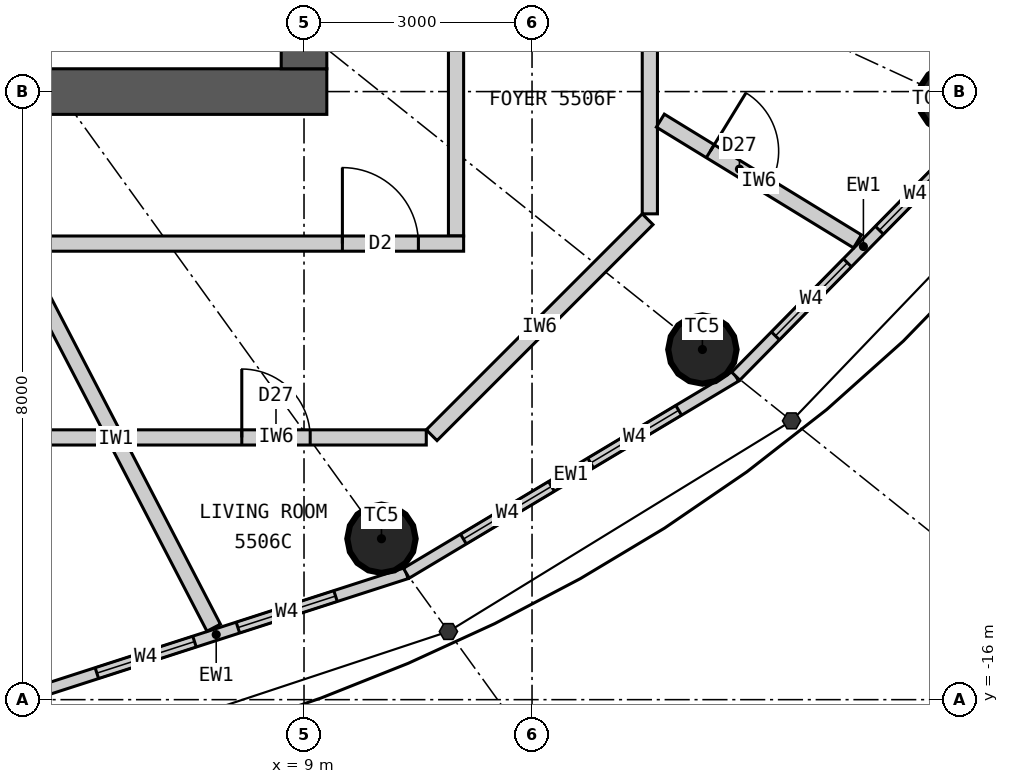
"""IFC4 building model, lengths in metres.
Left out: names, types, materials, properties, quantities, classifications, styles, units other than length and angle.
Written with IfcOpenShell. Run it as: python <this file> out.ifc"""

import sys

from ifc_helpers import new_model, si_unit, direction, frame, frame_2d, origin, origin_2d, place, context, subcontext, project, spatial, rectangle, circle, extrude, element, fill, save


model = new_model("IFC4")
c1 = context("Model", 3, precision=1e-05, world=origin(), true_north=direction((0.0, 1.0)))
c2 = subcontext(c1, "Body", "Model", "MODEL_VIEW")
j1 = project(units=[si_unit("LENGTHUNIT", "METRE"), si_unit("PLANEANGLEUNIT", "RADIAN")], contexts=[c1])
p1 = place(None, origin())
s1 = spatial("IfcSite", under=j1, at=p1, CompositionType="ELEMENT")
p2 = place(p1, origin())
s2 = spatial("IfcBuilding", under=s1, at=p2, CompositionType="ELEMENT")
p3 = place(p2, frame((0.0, 0.0, 206.1)))
s3 = spatial("IfcBuildingStorey", under=s2, at=p3, CompositionType="ELEMENT", Elevation=206.1)
for number, where, z_axis, x_axis in (
    (1, (10.019, -13.883, 0.0), (0.0, 0.0, 1.0), (1.0, 0.0, 0.0)),
    (2, (14.241, -11.393, 0.0), (0.0, 0.0, 1.0), (1.0, 0.0, 0.0)),
    (3, (17.532, -8.098, 0.0), (0.0, 0.0, 1.0), (1.0, 0.0, 0.0)),
):
    element("IfcColumn", number, at=place(p3, frame(where, z_axis=z_axis, x_axis=x_axis)), inside=s3, PredefinedType="COLUMN", context=c2, shape_type="SweptSolid", body=[
        extrude(circle(Radius=0.45, at=origin_2d()), origin(), (0.0, 0.0, 1.0), 3.3),
    ])
p4 = place(p3, frame((9.3, -8.0, 0.0), z_axis=(0.0, 0.0, 1.0), x_axis=(-1.0, 0.0, 0.0)))
e4 = element("IfcWall", 4, at=p4, inside=s3, PredefinedType="SHEAR", context=c2, shape_type="SweptSolid", body=[
    extrude(rectangle(XDim=18.6, YDim=0.6, at=frame_2d((9.3, 0.0))), origin(), (0.0, 0.0, 1.0), 3.3),
])
p5 = place(p4, frame((8.0, 0.0, 0.0)))
e5 = element("IfcOpeningElement", 5, at=p5, cuts=e4, PredefinedType="OPENING", context=c2, shape_type="SweptSolid", body=[
    extrude(rectangle(XDim=1.2, YDim=2.2, at=frame_2d((0.6, 1.1))), frame((0.0, 0.31, 0.0), z_axis=(0.0, -1.0, 0.0), x_axis=(1.0, 0.0, 0.0)), (0.0, 0.0, 1.0), 0.62),
])
p6 = place(p4, frame((15.6, 0.0, 0.0)))
e6 = element("IfcOpeningElement", 6, at=p6, cuts=e4, PredefinedType="OPENING", context=c2, shape_type="SweptSolid", body=[
    extrude(rectangle(XDim=0.9, YDim=2.2, at=frame_2d((0.45, 1.1))), frame((0.0, 0.31, 0.0), z_axis=(0.0, -1.0, 0.0), x_axis=(1.0, 0.0, 0.0)), (0.0, 0.0, 1.0), 0.62),
])
p7 = place(p3, frame((9.0, -7.7, 0.0), z_axis=(0.0, 0.0, 1.0), x_axis=(0.0, 1.0, 0.0)))
e7 = element("IfcWall", 7, at=p7, inside=s3, PredefinedType="SHEAR", context=c2, shape_type="SweptSolid", body=[
    extrude(rectangle(XDim=15.4, YDim=0.6, at=frame_2d((7.7, 0.0))), origin(), (0.0, 0.0, 1.0), 3.3),
])
p8 = place(p7, frame((6.8, 0.0, 0.0)))
e8 = element("IfcOpeningElement", 8, at=p8, cuts=e7, PredefinedType="OPENING", context=c2, shape_type="SweptSolid", body=[
    extrude(rectangle(XDim=1.8, YDim=2.2, at=frame_2d((0.9, 1.1))), frame((0.0, 0.31, 0.0), z_axis=(0.0, -1.0, 0.0), x_axis=(1.0, 0.0, 0.0)), (0.0, 0.0, 1.0), 0.62),
])
p9 = place(p3, frame((5.343, -15.952, 0.0), z_axis=(0.0, 0.0, 1.0), x_axis=(0.951644702515, 0.307200846638, 0.0)))
e9 = element("IfcWall", 9, at=p9, inside=s3, PredefinedType="ELEMENTEDWALL", context=c2, shape_type="SweptSolid", body=[
    extrude(rectangle(XDim=5.258, YDim=0.15, at=frame_2d((2.629, 0.0))), origin(), (0.0, 0.0, 1.0), 3.12),
])
p10 = place(p9, frame((0.979, 0.0, 0.9)))
e10 = element("IfcOpeningElement", 10, at=p10, cuts=e9, PredefinedType="OPENING", context=c2, shape_type="SweptSolid", body=[
    extrude(rectangle(XDim=1.35, YDim=1.9, at=frame_2d((0.675, 0.95))), frame((0.0, 0.085, 0.0), z_axis=(0.0, -1.0, 0.0), x_axis=(1.0, 0.0, 0.0)), (0.0, 0.0, 1.0), 0.17),
])
p11 = place(p9, frame((2.929, 0.0, 0.9)))
e11 = element("IfcOpeningElement", 11, at=p11, cuts=e9, PredefinedType="OPENING", context=c2, shape_type="SweptSolid", body=[
    extrude(rectangle(XDim=1.35, YDim=1.9, at=frame_2d((0.675, 0.95))), frame((0.0, 0.085, 0.0), z_axis=(0.0, -1.0, 0.0), x_axis=(1.0, 0.0, 0.0)), (0.0, 0.0, 1.0), 0.17),
])
p12 = place(p3, frame((10.346, -14.336, 0.0), z_axis=(0.0, 0.0, 1.0), x_axis=(0.85822150553, 0.513279502265, 0.0)))
e12 = element("IfcWall", 12, at=p12, inside=s3, PredefinedType="ELEMENTEDWALL", context=c2, shape_type="SweptSolid", body=[
    extrude(rectangle(XDim=5.05, YDim=0.15, at=frame_2d((2.525, 0.0))), origin(), (0.0, 0.0, 1.0), 3.12),
])
p13 = place(p12, frame((0.875, 0.0, 0.9)))
e13 = element("IfcOpeningElement", 13, at=p13, cuts=e12, PredefinedType="OPENING", context=c2, shape_type="SweptSolid", body=[
    extrude(rectangle(XDim=1.35, YDim=1.9, at=frame_2d((0.675, 0.95))), frame((0.0, 0.085, 0.0), z_axis=(0.0, -1.0, 0.0), x_axis=(1.0, 0.0, 0.0)), (0.0, 0.0, 1.0), 0.17),
])
p14 = place(p12, frame((2.825, 0.0, 0.9)))
e14 = element("IfcOpeningElement", 14, at=p14, cuts=e12, PredefinedType="OPENING", context=c2, shape_type="SweptSolid", body=[
    extrude(rectangle(XDim=1.35, YDim=1.9, at=frame_2d((0.675, 0.95))), frame((0.0, 0.085, 0.0), z_axis=(0.0, -1.0, 0.0), x_axis=(1.0, 0.0, 0.0)), (0.0, 0.0, 1.0), 0.17),
])
p15 = place(p3, frame((14.68, -11.744, 0.0), z_axis=(0.0, 0.0, 1.0), x_axis=(0.701527379618, 0.712642501993, 0.0)))
e15 = element("IfcWall", 15, at=p15, inside=s3, PredefinedType="ELEMENTEDWALL", context=c2, shape_type="SweptSolid", body=[
    extrude(rectangle(XDim=4.788, YDim=0.15, at=frame_2d((2.394, 0.0))), origin(), (0.0, 0.0, 1.0), 3.12),
])
p16 = place(p15, frame((0.744, 0.0, 0.9)))
e16 = element("IfcOpeningElement", 16, at=p16, cuts=e15, PredefinedType="OPENING", context=c2, shape_type="SweptSolid", body=[
    extrude(rectangle(XDim=1.35, YDim=1.9, at=frame_2d((0.675, 0.95))), frame((0.0, 0.085, 0.0), z_axis=(0.0, -1.0, 0.0), x_axis=(1.0, 0.0, 0.0)), (0.0, 0.0, 1.0), 0.17),
])
p17 = place(p15, frame((2.694, 0.0, 0.9)))
e17 = element("IfcOpeningElement", 17, at=p17, cuts=e15, PredefinedType="OPENING", context=c2, shape_type="SweptSolid", body=[
    extrude(rectangle(XDim=1.35, YDim=1.9, at=frame_2d((0.675, 0.95))), frame((0.0, 0.085, 0.0), z_axis=(0.0, -1.0, 0.0), x_axis=(1.0, 0.0, 0.0)), (0.0, 0.0, 1.0), 0.17),
])
p18 = place(p3, frame((11.0, -9.9, 0.0), z_axis=(0.0, 0.0, 1.0), x_axis=(0.0, 1.0, 0.0)))
e18 = element("IfcWall", 18, at=p18, inside=s3, PredefinedType="PARTITIONING", context=c2, shape_type="SweptSolid", body=[
    extrude(rectangle(XDim=19.8, YDim=0.2, at=frame_2d((9.9, 0.0))), origin(), (0.0, 0.0, 1.0), 3.12),
])
p19 = place(p3, frame((11.1, -10.0, 0.0), z_axis=(0.0, 0.0, 1.0), x_axis=(-1.0, 0.0, 0.0)))
e19 = element("IfcWall", 19, at=p19, inside=s3, PredefinedType="PARTITIONING", context=c2, shape_type="SweptSolid", body=[
    extrude(rectangle(XDim=22.2, YDim=0.2, at=frame_2d((11.1, 0.0))), origin(), (0.0, 0.0, 1.0), 3.12),
])
p20 = place(p19, frame((11.36, 0.0, 0.0)))
e20 = element("IfcOpeningElement", 20, at=p20, cuts=e19, PredefinedType="OPENING", context=c2, shape_type="SweptSolid", body=[
    extrude(rectangle(XDim=1.0, YDim=2.2, at=frame_2d((0.5, 1.1))), frame((0.0, 0.11, 0.0), z_axis=(0.0, -1.0, 0.0), x_axis=(1.0, 0.0, 0.0)), (0.0, 0.0, 1.0), 0.22),
])
p21 = place(p19, frame((0.595, 0.0, 0.0)))
e21 = element("IfcOpeningElement", 21, at=p21, cuts=e19, PredefinedType="OPENING", context=c2, shape_type="SweptSolid", body=[
    extrude(rectangle(XDim=1.0, YDim=2.2, at=frame_2d((0.5, 1.1))), frame((0.0, 0.11, 0.0), z_axis=(0.0, -1.0, 0.0), x_axis=(1.0, 0.0, 0.0)), (0.0, 0.0, 1.0), 0.22),
])
p22 = place(p3, frame((5.241, -10.1, 0.0), z_axis=(0.0, 0.0, 1.0), x_axis=(0.460603196597, -0.887606160008, 0.0)))
e22 = element("IfcWall", 22, at=p22, inside=s3, PredefinedType="PARTITIONING", context=c2, shape_type="SweptSolid", body=[
    extrude(rectangle(XDim=5.58, YDim=0.2, at=frame_2d((2.79, 0.0))), origin(), (0.0, 0.0, 1.0), 3.12),
])
p23 = place(p3, frame((-4.082, -12.55, 0.0), z_axis=(0.0, 0.0, 1.0), x_axis=(1.0, 0.0, 0.0)))
e23 = element("IfcWall", 23, at=p23, inside=s3, PredefinedType="PARTITIONING", context=c2, shape_type="SweptSolid", body=[
    extrude(rectangle(XDim=10.446, YDim=0.2, at=frame_2d((5.223, 0.0))), origin(), (0.0, 0.0, 1.0), 3.12),
])
p24 = place(p23, frame((6.757, 0.0, 0.0)))
e24 = element("IfcOpeningElement", 24, at=p24, cuts=e23, PredefinedType="OPENING", context=c2, shape_type="SweptSolid", body=[
    extrude(rectangle(XDim=0.8, YDim=2.1, at=frame_2d((0.4, 1.05))), frame((0.0, 0.11, 0.0), z_axis=(0.0, -1.0, 0.0), x_axis=(1.0, 0.0, 0.0)), (0.0, 0.0, 1.0), 0.22),
])
p25 = place(p23, frame((3.372, 0.0, 0.0)))
e25 = element("IfcOpeningElement", 25, at=p25, cuts=e23, PredefinedType="OPENING", context=c2, shape_type="SweptSolid", body=[
    extrude(rectangle(XDim=0.9, YDim=2.1, at=frame_2d((0.45, 1.05))), frame((0.0, 0.11, 0.0), z_axis=(0.0, -1.0, 0.0), x_axis=(1.0, 0.0, 0.0)), (0.0, 0.0, 1.0), 0.22),
])
p26 = place(p3, frame((6.661, -12.55, 0.0), z_axis=(0.0, 0.0, 1.0), x_axis=(1.0, 0.0, 0.0)))
e26 = element("IfcWall", 26, at=p26, inside=s3, PredefinedType="PARTITIONING", context=c2, shape_type="SweptSolid", body=[
    extrude(rectangle(XDim=3.947, YDim=0.2, at=frame_2d((1.974, 0.0))), origin(), (0.0, 0.0, 1.0), 3.12),
])
p27 = place(p26, frame((1.52, 0.0, 0.0)))
e27 = element("IfcOpeningElement", 27, at=p27, cuts=e26, PredefinedType="OPENING", context=c2, shape_type="SweptSolid", body=[
    extrude(rectangle(XDim=0.9, YDim=2.1, at=frame_2d((0.45, 1.05))), frame((0.0, 0.11, 0.0), z_axis=(0.0, -1.0, 0.0), x_axis=(1.0, 0.0, 0.0)), (0.0, 0.0, 1.0), 0.22),
])
p28 = place(p3, frame((10.679, -12.521, 0.0), z_axis=(0.0, 0.0, 1.0), x_axis=(0.707106781187, 0.707106781187, 0.0)))
e28 = element("IfcWall", 28, at=p28, inside=s3, PredefinedType="PARTITIONING", context=c2, shape_type="SweptSolid", body=[
    extrude(rectangle(XDim=4.019, YDim=0.2, at=frame_2d((2.009, 0.0))), origin(), (0.0, 0.0, 1.0), 3.12),
])
p29 = place(p3, frame((13.55, -9.609, 0.0), z_axis=(0.0, 0.0, 1.0), x_axis=(0.0, 1.0, 0.0)))
e29 = element("IfcWall", 29, at=p29, inside=s3, PredefinedType="PARTITIONING", context=c2, shape_type="SweptSolid", body=[
    extrude(rectangle(XDim=10.93, YDim=0.2, at=frame_2d((5.465, 0.0))), origin(), (0.0, 0.0, 1.0), 3.12),
])
p30 = place(p29, frame((5.02, 0.0, 0.0)))
e30 = element("IfcOpeningElement", 30, at=p30, cuts=e29, PredefinedType="OPENING", context=c2, shape_type="SweptSolid", body=[
    extrude(rectangle(XDim=0.9, YDim=2.1, at=frame_2d((0.45, 1.05))), frame((0.0, 0.11, 0.0), z_axis=(0.0, -1.0, 0.0), x_axis=(1.0, 0.0, 0.0)), (0.0, 0.0, 1.0), 0.22),
])
p31 = place(p29, frame((6.877, 0.0, 0.0)))
e31 = element("IfcOpeningElement", 31, at=p31, cuts=e29, PredefinedType="OPENING", context=c2, shape_type="SweptSolid", body=[
    extrude(rectangle(XDim=0.9, YDim=2.1, at=frame_2d((0.45, 1.05))), frame((0.0, 0.11, 0.0), z_axis=(0.0, -1.0, 0.0), x_axis=(1.0, 0.0, 0.0)), (0.0, 0.0, 1.0), 0.22),
])
p32 = place(p29, frame((8.565, 0.0, 0.0)))
e32 = element("IfcOpeningElement", 32, at=p32, cuts=e29, PredefinedType="OPENING", context=c2, shape_type="SweptSolid", body=[
    extrude(rectangle(XDim=0.8, YDim=2.1, at=frame_2d((0.4, 1.05))), frame((0.0, 0.11, 0.0), z_axis=(0.0, -1.0, 0.0), x_axis=(1.0, 0.0, 0.0)), (0.0, 0.0, 1.0), 0.22),
])
p33 = place(p3, frame((13.688, -8.382, 0.0), z_axis=(0.0, 0.0, 1.0), x_axis=(0.852783459586, -0.522264656144, 0.0)))
e33 = element("IfcWall", 33, at=p33, inside=s3, PredefinedType="PARTITIONING", context=c2, shape_type="SweptSolid", body=[
    extrude(rectangle(XDim=3.042, YDim=0.2, at=frame_2d((1.521, 0.0))), origin(), (0.0, 0.0, 1.0), 3.12),
])
p34 = place(p33, frame((0.77, 0.0, 0.0)))
e34 = element("IfcOpeningElement", 34, at=p34, cuts=e33, PredefinedType="OPENING", context=c2, shape_type="SweptSolid", body=[
    extrude(rectangle(XDim=0.9, YDim=2.1, at=frame_2d((0.45, 1.05))), frame((0.0, 0.11, 0.0), z_axis=(0.0, -1.0, 0.0), x_axis=(1.0, 0.0, 0.0)), (0.0, 0.0, 1.0), 0.22),
])
p35 = place(p10, origin())
e35 = element("IfcWindow", 35, at=p35, inside=s3, PartitioningType="SINGLE_PANEL", PredefinedType="WINDOW", context=c2, shape_type="SweptSolid", body=[
    extrude(rectangle(XDim=1.35, YDim=1.9, at=frame_2d((0.675, 0.95))), frame((0.0, 0.03, 0.0), z_axis=(0.0, -1.0, 0.0), x_axis=(1.0, 0.0, 0.0)), (0.0, 0.0, 1.0), 0.06),
])
fill(e10, e35)
p36 = place(p11, origin())
e36 = element("IfcWindow", 36, at=p36, inside=s3, PartitioningType="SINGLE_PANEL", PredefinedType="WINDOW", context=c2, shape_type="SweptSolid", body=[
    extrude(rectangle(XDim=1.35, YDim=1.9, at=frame_2d((0.675, 0.95))), frame((0.0, 0.03, 0.0), z_axis=(0.0, -1.0, 0.0), x_axis=(1.0, 0.0, 0.0)), (0.0, 0.0, 1.0), 0.06),
])
fill(e11, e36)
p37 = place(p13, origin())
e37 = element("IfcWindow", 37, at=p37, inside=s3, PartitioningType="SINGLE_PANEL", PredefinedType="WINDOW", context=c2, shape_type="SweptSolid", body=[
    extrude(rectangle(XDim=1.35, YDim=1.9, at=frame_2d((0.675, 0.95))), frame((0.0, 0.03, 0.0), z_axis=(0.0, -1.0, 0.0), x_axis=(1.0, 0.0, 0.0)), (0.0, 0.0, 1.0), 0.06),
])
fill(e13, e37)
p38 = place(p14, origin())
e38 = element("IfcWindow", 38, at=p38, inside=s3, PartitioningType="SINGLE_PANEL", PredefinedType="WINDOW", context=c2, shape_type="SweptSolid", body=[
    extrude(rectangle(XDim=1.35, YDim=1.9, at=frame_2d((0.675, 0.95))), frame((0.0, 0.03, 0.0), z_axis=(0.0, -1.0, 0.0), x_axis=(1.0, 0.0, 0.0)), (0.0, 0.0, 1.0), 0.06),
])
fill(e14, e38)
p39 = place(p16, origin())
e39 = element("IfcWindow", 39, at=p39, inside=s3, PartitioningType="SINGLE_PANEL", PredefinedType="WINDOW", context=c2, shape_type="SweptSolid", body=[
    extrude(rectangle(XDim=1.35, YDim=1.9, at=frame_2d((0.675, 0.95))), frame((0.0, 0.03, 0.0), z_axis=(0.0, -1.0, 0.0), x_axis=(1.0, 0.0, 0.0)), (0.0, 0.0, 1.0), 0.06),
])
fill(e16, e39)
p40 = place(p17, origin())
e40 = element("IfcWindow", 40, at=p40, inside=s3, PartitioningType="SINGLE_PANEL", PredefinedType="WINDOW", context=c2, shape_type="SweptSolid", body=[
    extrude(rectangle(XDim=1.35, YDim=1.9, at=frame_2d((0.675, 0.95))), frame((0.0, 0.03, 0.0), z_axis=(0.0, -1.0, 0.0), x_axis=(1.0, 0.0, 0.0)), (0.0, 0.0, 1.0), 0.06),
])
fill(e17, e40)
p41 = place(p21, origin())
e41 = element("IfcDoor", 41, at=p41, inside=s3, OperationType="SINGLE_SWING_RIGHT", PredefinedType="DOOR", context=c2, shape_type="SweptSolid", body=[
    extrude(rectangle(XDim=1.0, YDim=2.2, at=frame_2d((0.5, 1.1))), frame((0.0, 0.025, 0.0), z_axis=(0.0, -1.0, 0.0), x_axis=(1.0, 0.0, 0.0)), (0.0, 0.0, 1.0), 0.05),
])
fill(e21, e41)
p42 = place(p27, origin())
e42 = element("IfcDoor", 42, at=p42, inside=s3, OperationType="SINGLE_SWING_LEFT", PredefinedType="DOOR", context=c2, shape_type="SweptSolid", body=[
    extrude(rectangle(XDim=0.9, YDim=2.1, at=frame_2d((0.45, 1.05))), frame((0.0, 0.025, 0.0), z_axis=(0.0, -1.0, 0.0), x_axis=(1.0, 0.0, 0.0)), (0.0, 0.0, 1.0), 0.05),
])
fill(e27, e42)
p43 = place(p34, origin())
e43 = element("IfcDoor", 43, at=p43, inside=s3, OperationType="SINGLE_SWING_LEFT", PredefinedType="DOOR", context=c2, shape_type="SweptSolid", body=[
    extrude(rectangle(XDim=0.9, YDim=2.1, at=frame_2d((0.45, 1.05))), frame((0.0, 0.025, 0.0), z_axis=(0.0, -1.0, 0.0), x_axis=(1.0, 0.0, 0.0)), (0.0, 0.0, 1.0), 0.05),
])
fill(e34, e43)
save(model, sys.argv[1])
